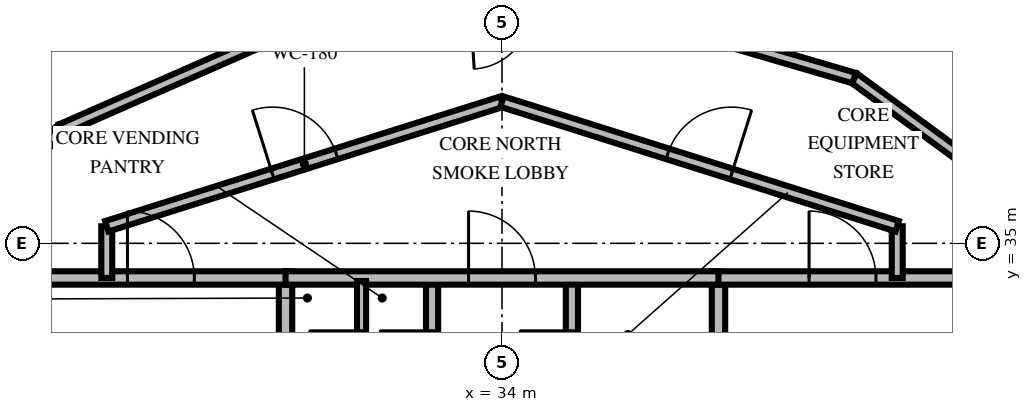
"""IFC4 building model, lengths in metres.
Left out: names, types, materials, properties, quantities, classifications, styles, units other than length and angle.
Written with IfcOpenShell. Run it as: python <this file> out.ifc"""

import sys

from ifc_helpers import new_model, si_unit, direction, frame, frame_2d, origin, place, context, subcontext, project, spatial, rectangle, extrude, element, fill, save


model = new_model("IFC4")
c1 = context("Model", 3, precision=1e-05, world=origin(), true_north=direction((0.0, 1.0)))
c2 = subcontext(c1, "Body", "Model", "MODEL_VIEW")
j1 = project(units=[si_unit("LENGTHUNIT", "METRE"), si_unit("PLANEANGLEUNIT", "RADIAN")], contexts=[c1])
p1 = place(None, origin())
s1 = spatial("IfcSite", under=j1, at=p1, CompositionType="ELEMENT")
p2 = place(p1, origin())
s2 = spatial("IfcBuilding", under=s1, at=p2, CompositionType="ELEMENT")
p3 = place(p2, frame((0.0, 0.0, 213.2)))
s3 = spatial("IfcBuildingStorey", under=s2, at=p3, CompositionType="ELEMENT", Elevation=213.2)
p4 = place(p3, frame((30.44, 30.05, 0.0), z_axis=(0.0, 0.0, 1.0), x_axis=(0.0, 1.0, 0.0)))
e1 = element("IfcWall", 1, at=p4, inside=s3, PredefinedType="SOLIDWALL", context=c2, shape_type="SweptSolid", body=[
    extrude(rectangle(XDim=4.38, YDim=0.22, at=frame_2d((2.19, 0.0))), origin(), (0.0, 0.0, 1.0), 2.46),
])
p5 = place(p4, frame((0.8, 0.0, 0.0)))
e2 = element("IfcOpeningElement", 2, at=p5, cuts=e1, PredefinedType="OPENING", context=c2, shape_type="SweptSolid", body=[
    extrude(rectangle(XDim=1.05, YDim=2.1, at=frame_2d((0.525, 1.05))), frame((0.0, 0.12, 0.0), z_axis=(0.0, -1.0, 0.0), x_axis=(1.0, 0.0, 0.0)), (0.0, 0.0, 1.0), 0.24),
])
p6 = place(p3, frame((26.24, 34.43, 0.0), z_axis=(0.0, 0.0, 1.0), x_axis=(1.0, 0.0, 0.0)))
e3 = element("IfcWall", 3, at=p6, inside=s3, PredefinedType="SOLIDWALL", context=c2, shape_type="SweptSolid", body=[
    extrude(rectangle(XDim=4.31, YDim=0.22, at=frame_2d((2.155, 0.0))), origin(), (0.0, 0.0, 1.0), 2.46),
])
p7 = place(p6, frame((1.6, 0.0, 0.0)))
e4 = element("IfcOpeningElement", 4, at=p7, cuts=e3, PredefinedType="OPENING", context=c2, shape_type="SweptSolid", body=[
    extrude(rectangle(XDim=1.1, YDim=2.15, at=frame_2d((0.55, 1.075))), frame((0.0, 0.12, 0.0), z_axis=(0.0, -1.0, 0.0), x_axis=(1.0, 0.0, 0.0)), (0.0, 0.0, 1.0), 0.24),
])
p8 = place(p3, frame((32.85, 30.05, 0.0), z_axis=(0.0, 0.0, 1.0), x_axis=(0.0, 1.0, 0.0)))
e5 = element("IfcWall", 5, at=p8, inside=s3, PredefinedType="SOLIDWALL", context=c2, shape_type="SweptSolid", body=[
    extrude(rectangle(XDim=4.38, YDim=0.2, at=frame_2d((2.19, 0.0))), origin(), (0.0, 0.0, 1.0), 2.46),
])
p9 = place(p8, frame((2.65, 0.0, 0.0)))
e6 = element("IfcOpeningElement", 6, at=p9, cuts=e5, PredefinedType="OPENING", context=c2, shape_type="SweptSolid", body=[
    extrude(rectangle(XDim=0.86, YDim=2.05, at=frame_2d((0.43, 1.025))), frame((0.0, 0.11, 0.0), z_axis=(0.0, -1.0, 0.0), x_axis=(1.0, 0.0, 0.0)), (0.0, 0.0, 1.0), 0.22),
])
p10 = place(p3, frame((37.56, 30.05, 0.0), z_axis=(0.0, 0.0, 1.0), x_axis=(0.0, 1.0, 0.0)))
e7 = element("IfcWall", 7, at=p10, inside=s3, PredefinedType="SOLIDWALL", context=c2, shape_type="SweptSolid", body=[
    extrude(rectangle(XDim=4.38, YDim=0.22, at=frame_2d((2.19, 0.0))), origin(), (0.0, 0.0, 1.0), 2.46),
])
p11 = place(p10, frame((0.8, 0.0, 0.0)))
e8 = element("IfcOpeningElement", 8, at=p11, cuts=e7, PredefinedType="OPENING", context=c2, shape_type="SweptSolid", body=[
    extrude(rectangle(XDim=1.05, YDim=2.1, at=frame_2d((0.525, 1.05))), frame((0.0, 0.12, 0.0), z_axis=(0.0, -1.0, 0.0), x_axis=(1.0, 0.0, 0.0)), (0.0, 0.0, 1.0), 0.24),
])
p12 = place(p3, frame((37.45, 34.43, 0.0), z_axis=(0.0, 0.0, 1.0), x_axis=(1.0, 0.0, 0.0)))
e9 = element("IfcWall", 9, at=p12, inside=s3, PredefinedType="SOLIDWALL", context=c2, shape_type="SweptSolid", body=[
    extrude(rectangle(XDim=4.31, YDim=0.22, at=frame_2d((2.155, 0.0))), origin(), (0.0, 0.0, 1.0), 2.46),
])
p13 = place(p12, frame((1.6, 0.0, 0.0)))
e10 = element("IfcOpeningElement", 10, at=p13, cuts=e9, PredefinedType="OPENING", context=c2, shape_type="SweptSolid", body=[
    extrude(rectangle(XDim=1.1, YDim=2.15, at=frame_2d((0.55, 1.075))), frame((0.0, 0.12, 0.0), z_axis=(0.0, -1.0, 0.0), x_axis=(1.0, 0.0, 0.0)), (0.0, 0.0, 1.0), 0.24),
])
p14 = place(p3, frame((35.15, 30.05, 0.0), z_axis=(0.0, 0.0, 1.0), x_axis=(0.0, 1.0, 0.0)))
e11 = element("IfcWall", 11, at=p14, inside=s3, PredefinedType="SOLIDWALL", context=c2, shape_type="SweptSolid", body=[
    extrude(rectangle(XDim=4.38, YDim=0.2, at=frame_2d((2.19, 0.0))), origin(), (0.0, 0.0, 1.0), 2.46),
])
p15 = place(p14, frame((2.65, 0.0, 0.0)))
e12 = element("IfcOpeningElement", 12, at=p15, cuts=e11, PredefinedType="OPENING", context=c2, shape_type="SweptSolid", body=[
    extrude(rectangle(XDim=0.86, YDim=2.05, at=frame_2d((0.43, 1.025))), frame((0.0, 0.11, 0.0), z_axis=(0.0, -1.0, 0.0), x_axis=(1.0, 0.0, 0.0)), (0.0, 0.0, 1.0), 0.22),
])
p16 = place(p3, frame((30.44, 34.43, 0.0), z_axis=(0.0, 0.0, 1.0), x_axis=(1.0, 0.0, 0.0)))
e13 = element("IfcWall", 13, at=p16, inside=s3, PredefinedType="SOLIDWALL", context=c2, shape_type="SweptSolid", body=[
    extrude(rectangle(XDim=7.12, YDim=0.22, at=frame_2d((3.56, 0.0))), origin(), (0.0, 0.0, 1.0), 2.46),
])
p17 = place(p16, frame((3.01, 0.0, 0.0)))
e14 = element("IfcOpeningElement", 14, at=p17, cuts=e13, PredefinedType="OPENING", context=c2, shape_type="SweptSolid", body=[
    extrude(rectangle(XDim=1.1, YDim=2.15, at=frame_2d((0.55, 1.075))), frame((0.0, 0.12, 0.0), z_axis=(0.0, -1.0, 0.0), x_axis=(1.0, 0.0, 0.0)), (0.0, 0.0, 1.0), 0.24),
])
p18 = place(p3, frame((31.69, 32.05, 0.0), z_axis=(0.0, 0.0, 1.0), x_axis=(0.0, 1.0, 0.0)))
e15 = element("IfcWall", 15, at=p18, inside=s3, PredefinedType="PARTITIONING", context=c2, shape_type="SweptSolid", body=[
    extrude(rectangle(XDim=2.33, YDim=0.15, at=frame_2d((1.165, 0.0))), origin(), (0.0, 0.0, 1.0), 2.46),
])
p19 = place(p18, frame((0.65, 0.0, 0.0)))
e16 = element("IfcOpeningElement", 16, at=p19, cuts=e15, PredefinedType="OPENING", context=c2, shape_type="SweptSolid", body=[
    extrude(rectangle(XDim=0.86, YDim=2.05, at=frame_2d((0.43, 1.025))), frame((0.0, 0.085, 0.0), z_axis=(0.0, -1.0, 0.0), x_axis=(1.0, 0.0, 0.0)), (0.0, 0.0, 1.0), 0.17),
])
for number, where, z_axis, x_axis in (
    (17, (27.5, 34.43, 0.0), (0.0, 0.0, 1.0), (0.0, 1.0, 0.0)),
    (18, (40.5, 35.28, 0.0), (0.0, 0.0, 1.0), (0.0, -1.0, 0.0)),
):
    element("IfcWall", number, at=place(p3, frame(where, z_axis=z_axis, x_axis=x_axis)), inside=s3, PredefinedType="PARTITIONING", context=c2, shape_type="SweptSolid", body=[
        extrude(rectangle(XDim=0.85, YDim=0.18, at=frame_2d((0.425, 0.0))), origin(), (0.0, 0.0, 1.0), 2.46),
    ])
p20 = place(p3, frame((27.5, 35.28, 0.0), z_axis=(0.0, 0.0, 1.0), x_axis=(0.953691418528, 0.300786765376, 0.0)))
e19 = element("IfcWall", 19, at=p20, inside=s3, PredefinedType="PARTITIONING", context=c2, shape_type="SweptSolid", body=[
    extrude(rectangle(XDim=6.816, YDim=0.18, at=frame_2d((3.408, 0.0))), origin(), (0.0, 0.0, 1.0), 2.46),
])
p21 = place(p20, frame((2.858, 0.0, 0.0)))
e20 = element("IfcOpeningElement", 20, at=p21, cuts=e19, PredefinedType="OPENING", context=c2, shape_type="SweptSolid", body=[
    extrude(rectangle(XDim=1.1, YDim=2.15, at=frame_2d((0.55, 1.075))), frame((0.0, 0.1, 0.0), z_axis=(0.0, -1.0, 0.0), x_axis=(1.0, 0.0, 0.0)), (0.0, 0.0, 1.0), 0.2),
])
p22 = place(p3, frame((34.0, 37.33, 0.0), z_axis=(0.0, 0.0, 1.0), x_axis=(0.953691418528, -0.300786765376, 0.0)))
e21 = element("IfcWall", 21, at=p22, inside=s3, PredefinedType="PARTITIONING", context=c2, shape_type="SweptSolid", body=[
    extrude(rectangle(XDim=6.816, YDim=0.18, at=frame_2d((3.408, 0.0))), origin(), (0.0, 0.0, 1.0), 2.46),
])
p23 = place(p22, frame((2.858, 0.0, 0.0)))
e22 = element("IfcOpeningElement", 22, at=p23, cuts=e21, PredefinedType="OPENING", context=c2, shape_type="SweptSolid", body=[
    extrude(rectangle(XDim=1.1, YDim=2.15, at=frame_2d((0.55, 1.075))), frame((0.0, 0.1, 0.0), z_axis=(0.0, -1.0, 0.0), x_axis=(1.0, 0.0, 0.0)), (0.0, 0.0, 1.0), 0.2),
])
p24 = place(p3, frame((43.449, 35.03, 0.0), z_axis=(0.0, 0.0, 1.0), x_axis=(-0.805924234129, 0.592018689606, 0.0)))
e23 = element("IfcWall", 23, at=p24, inside=s3, PredefinedType="PARTITIONING", context=c2, shape_type="SweptSolid", body=[
    extrude(rectangle(XDim=4.539, YDim=0.18, at=frame_2d((2.27, 0.0))), origin(), (0.0, 0.0, 1.0), 2.46),
])
p25 = place(p3, frame((39.791, 37.717, 0.0), z_axis=(0.0, 0.0, 1.0), x_axis=(-0.95979856343, 0.280689717726, 0.0)))
e24 = element("IfcWall", 24, at=p25, inside=s3, PredefinedType="PARTITIONING", context=c2, shape_type="SweptSolid", body=[
    extrude(rectangle(XDim=4.539, YDim=0.18, at=frame_2d((2.27, 0.0))), origin(), (0.0, 0.0, 1.0), 2.46),
])
p26 = place(p3, frame((44.787, 36.308, 0.0), z_axis=(0.0, 0.0, 1.0), x_axis=(-0.80594787713, 0.591986502675, 0.0)))
e25 = element("IfcWall", 25, at=p26, inside=s3, PredefinedType="PARTITIONING", context=c2, shape_type="SweptSolid", body=[
    extrude(rectangle(XDim=5.181, YDim=0.16, at=frame_2d((2.591, 0.0))), origin(), (0.0, 0.0, 1.0), 2.46),
])
p27 = place(p3, frame((30.905, 38.698, 0.0), z_axis=(0.0, 0.0, 1.0), x_axis=(-0.915662861199, -0.401947166455, 0.0)))
e26 = element("IfcWall", 26, at=p27, inside=s3, PredefinedType="PARTITIONING", context=c2, shape_type="SweptSolid", body=[
    extrude(rectangle(XDim=4.539, YDim=0.18, at=frame_2d((2.27, 0.0))), origin(), (0.0, 0.0, 1.0), 2.46),
])
p28 = place(p3, frame((26.748, 36.874, 0.0), z_axis=(0.0, 0.0, 1.0), x_axis=(-0.722979348147, -0.690869641939, 0.0)))
e27 = element("IfcWall", 27, at=p28, inside=s3, PredefinedType="PARTITIONING", context=c2, shape_type="SweptSolid", body=[
    extrude(rectangle(XDim=4.539, YDim=0.18, at=frame_2d((2.27, 0.0))), origin(), (0.0, 0.0, 1.0), 2.46),
])
p29 = place(p7, origin())
e28 = element("IfcDoor", 28, at=p29, inside=s3, OperationType="SINGLE_SWING_LEFT", PredefinedType="DOOR", context=c2, shape_type="SweptSolid", body=[
    extrude(rectangle(XDim=1.1, YDim=2.15, at=frame_2d((0.55, 1.075))), frame((0.0, 0.025, 0.0), z_axis=(0.0, -1.0, 0.0), x_axis=(1.0, 0.0, 0.0)), (0.0, 0.0, 1.0), 0.05),
])
fill(e4, e28)
p30 = place(p9, origin())
e29 = element("IfcDoor", 29, at=p30, inside=s3, OperationType="SINGLE_SWING_RIGHT", PredefinedType="TRAPDOOR", context=c2, shape_type="SweptSolid", body=[
    extrude(rectangle(XDim=0.86, YDim=2.05, at=frame_2d((0.43, 1.025))), frame((0.0, 0.025, 0.0), z_axis=(0.0, -1.0, 0.0), x_axis=(1.0, 0.0, 0.0)), (0.0, 0.0, 1.0), 0.05),
])
fill(e6, e29)
p31 = place(p13, origin())
e30 = element("IfcDoor", 30, at=p31, inside=s3, OperationType="SINGLE_SWING_LEFT", PredefinedType="DOOR", context=c2, shape_type="SweptSolid", body=[
    extrude(rectangle(XDim=1.1, YDim=2.15, at=frame_2d((0.55, 1.075))), frame((0.0, 0.025, 0.0), z_axis=(0.0, -1.0, 0.0), x_axis=(1.0, 0.0, 0.0)), (0.0, 0.0, 1.0), 0.05),
])
fill(e10, e30)
p32 = place(p15, origin())
e31 = element("IfcDoor", 31, at=p32, inside=s3, OperationType="SINGLE_SWING_RIGHT", PredefinedType="TRAPDOOR", context=c2, shape_type="SweptSolid", body=[
    extrude(rectangle(XDim=0.86, YDim=2.05, at=frame_2d((0.43, 1.025))), frame((0.0, 0.025, 0.0), z_axis=(0.0, -1.0, 0.0), x_axis=(1.0, 0.0, 0.0)), (0.0, 0.0, 1.0), 0.05),
])
fill(e12, e31)
p33 = place(p17, origin())
e32 = element("IfcDoor", 32, at=p33, inside=s3, OperationType="SINGLE_SWING_LEFT", PredefinedType="DOOR", context=c2, shape_type="SweptSolid", body=[
    extrude(rectangle(XDim=1.1, YDim=2.15, at=frame_2d((0.55, 1.075))), frame((0.0, 0.025, 0.0), z_axis=(0.0, -1.0, 0.0), x_axis=(1.0, 0.0, 0.0)), (0.0, 0.0, 1.0), 0.05),
])
fill(e14, e32)
p34 = place(p19, origin())
e33 = element("IfcDoor", 33, at=p34, inside=s3, OperationType="SINGLE_SWING_RIGHT", PredefinedType="TRAPDOOR", context=c2, shape_type="SweptSolid", body=[
    extrude(rectangle(XDim=0.86, YDim=2.05, at=frame_2d((0.43, 1.025))), frame((0.0, 0.025, 0.0), z_axis=(0.0, -1.0, 0.0), x_axis=(1.0, 0.0, 0.0)), (0.0, 0.0, 1.0), 0.05),
])
fill(e16, e33)
p35 = place(p21, origin())
e34 = element("IfcDoor", 34, at=p35, inside=s3, OperationType="SINGLE_SWING_LEFT", PredefinedType="DOOR", context=c2, shape_type="SweptSolid", body=[
    extrude(rectangle(XDim=1.1, YDim=2.15, at=frame_2d((0.55, 1.075))), frame((0.0, 0.025, 0.0), z_axis=(0.0, -1.0, 0.0), x_axis=(1.0, 0.0, 0.0)), (0.0, 0.0, 1.0), 0.05),
])
fill(e20, e34)
p36 = place(p23, origin())
e35 = element("IfcDoor", 35, at=p36, inside=s3, OperationType="SINGLE_SWING_RIGHT", PredefinedType="DOOR", context=c2, shape_type="SweptSolid", body=[
    extrude(rectangle(XDim=1.1, YDim=2.15, at=frame_2d((0.55, 1.075))), frame((0.0, 0.025, 0.0), z_axis=(0.0, -1.0, 0.0), x_axis=(1.0, 0.0, 0.0)), (0.0, 0.0, 1.0), 0.05),
])
fill(e22, e35)
save(model, sys.argv[1])
